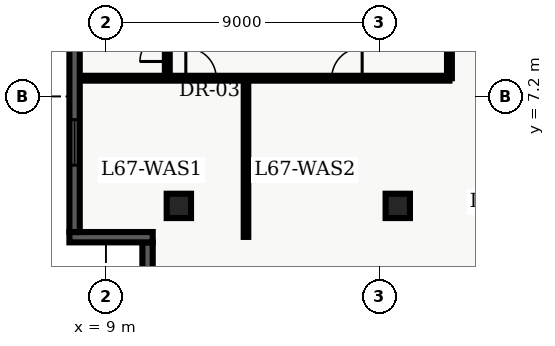
"""IFC4 building model, lengths in metres.
Left out: names, types, materials, properties, quantities, classifications, styles, units other than length and angle.
Written with IfcOpenShell. Run it as: python <this file> out.ifc"""

import sys

from ifc_helpers import new_model, entity, si_unit, converted_unit, direction, frame, origin_with_axes, origin_2d_with_axis, place, context, subcontext, project, spatial, polyline, rectangle, outline, extrude, element, fill, save


model = new_model("IFC4")
c1 = context("Model", 3, precision=1e-05, world=origin_with_axes(), true_north=direction((0.0, 1.0)))
c2 = subcontext(c1, "Body", "Model", "MODEL_VIEW")
j1 = project(units=[si_unit("LENGTHUNIT", "METRE"), converted_unit("PLANEANGLEUNIT", "DEGREE", entity("IfcPlaneAngleMeasure", 0.017), si_unit("PLANEANGLEUNIT", "RADIAN"), dimensions=[0, 0, 0, 0, 0, 0, 0])], contexts=[c1])
p1 = place(None, origin_with_axes())
s1 = spatial("IfcSite", under=j1, at=p1, CompositionType="ELEMENT")
p2 = place(p1, origin_with_axes())
s2 = spatial("IfcBuilding", under=s1, at=p2, CompositionType="ELEMENT")
p3 = place(p2, frame((0.0, 0.0, 272.4), z_axis=(0.0, 0.0, 1.0), x_axis=(1.0, 0.0, 0.0)))
s3 = spatial("IfcBuildingStorey", under=s2, at=p3, CompositionType="ELEMENT", Elevation=272.4)
for number, where, z_axis, x_axis in (
    (1, (11.4, 3.6, 0.0), (0.0, 0.0, 1.0), (1.0, 0.0, 0.0)),
    (2, (18.6, 3.6, 0.0), (0.0, 0.0, 1.0), (1.0, 0.0, 0.0)),
):
    element("IfcColumn", number, at=place(p3, frame(where, z_axis=z_axis, x_axis=x_axis)), inside=s3, PredefinedType="COLUMN", context=c2, shape_type="SweptSolid", body=[
        extrude(rectangle(XDim=0.8, YDim=0.8, at=origin_2d_with_axis()), origin_with_axes(), (0.0, 0.0, 1.0), 3.9),
    ])
p4 = place(p3, frame((8.135, 7.8, 0.0), z_axis=(0.0, 0.0, 1.0), x_axis=(1.0, 0.0, 0.0)))
e3 = element("IfcWall", 3, at=p4, inside=s3, PredefinedType="PARTITIONING", context=c2, shape_type="SweptSolid", body=[
    extrude(outline(polyline([(0.0, -0.08), (12.165, -0.08), (12.165, 0.08), (0.0, 0.08), (0.0, -0.08)])), origin_with_axes(), (0.0, 0.0, 1.0), 2.7),
])
p5 = place(p4, frame((3.994, 0.0, 0.0), z_axis=(0.0, 0.0, 1.0), x_axis=(1.0, 0.0, 0.0)))
e4 = element("IfcOpeningElement", 4, at=p5, cuts=e3, PredefinedType="OPENING", context=c2, shape_type="SweptSolid", body=[
    extrude(rectangle(XDim=1.0, YDim=0.18, at=origin_2d_with_axis()), origin_with_axes(), (0.0, 0.0, 1.0), 2.15),
])
p6 = place(p4, frame((8.794, 0.0, 0.0), z_axis=(0.0, 0.0, 1.0), x_axis=(1.0, 0.0, 0.0)))
e5 = element("IfcOpeningElement", 5, at=p6, cuts=e3, PredefinedType="OPENING", context=c2, shape_type="SweptSolid", body=[
    extrude(rectangle(XDim=1.0, YDim=0.18, at=origin_2d_with_axis()), origin_with_axes(), (0.0, 0.0, 1.0), 2.15),
])
p7 = place(p3, frame((20.3, 7.8, 0.0), z_axis=(0.0, 0.0, 1.0), x_axis=(0.0, 1.0, 0.0)))
e6 = element("IfcWall", 6, at=p7, inside=s3, PredefinedType="PARTITIONING", context=c2, shape_type="SweptSolid", body=[
    extrude(outline(polyline([(0.0, -0.08), (32.7, -0.08), (32.7, 0.08), (0.0, 0.08), (0.0, -0.08)])), origin_with_axes(), (0.0, 0.0, 1.0), 2.7),
])
p8 = place(p7, frame((14.2, 0.0, 0.0), z_axis=(0.0, 0.0, 1.0), x_axis=(1.0, 0.0, 0.0)))
e7 = element("IfcOpeningElement", 7, at=p8, cuts=e6, PredefinedType="OPENING", context=c2, shape_type="SweptSolid", body=[
    extrude(rectangle(XDim=1.0, YDim=0.18, at=origin_2d_with_axis()), origin_with_axes(), (0.0, 0.0, 1.0), 2.15),
])
p9 = place(p7, frame((18.779, 0.0, 0.0), z_axis=(0.0, 0.0, 1.0), x_axis=(1.0, 0.0, 0.0)))
e8 = element("IfcOpeningElement", 8, at=p9, cuts=e6, PredefinedType="OPENING", context=c2, shape_type="SweptSolid", body=[
    extrude(rectangle(XDim=1.0, YDim=0.18, at=origin_2d_with_axis()), origin_with_axes(), (0.0, 0.0, 1.0), 2.15),
])
p10 = place(p7, frame((23.784, 0.0, 0.0), z_axis=(0.0, 0.0, 1.0), x_axis=(1.0, 0.0, 0.0)))
e9 = element("IfcOpeningElement", 9, at=p10, cuts=e6, PredefinedType="OPENING", context=c2, shape_type="SweptSolid", body=[
    extrude(rectangle(XDim=1.0, YDim=0.18, at=origin_2d_with_axis()), origin_with_axes(), (0.0, 0.0, 1.0), 2.15),
])
p11 = place(p7, frame((27.651, 0.0, 0.0), z_axis=(0.0, 0.0, 1.0), x_axis=(1.0, 0.0, 0.0)))
e10 = element("IfcOpeningElement", 10, at=p11, cuts=e6, PredefinedType="OPENING", context=c2, shape_type="SweptSolid", body=[
    extrude(rectangle(XDim=1.0, YDim=0.18, at=origin_2d_with_axis()), origin_with_axes(), (0.0, 0.0, 1.0), 2.15),
])
p12 = place(p7, frame((5.475, 0.0, 0.0), z_axis=(0.0, 0.0, 1.0), x_axis=(1.0, 0.0, 0.0)))
e11 = element("IfcOpeningElement", 11, at=p12, cuts=e6, PredefinedType="OPENING", context=c2, shape_type="SweptSolid", body=[
    extrude(rectangle(XDim=1.05, YDim=0.18, at=origin_2d_with_axis()), origin_with_axes(), (0.0, 0.0, 1.0), 2.15),
])
p13 = place(p3, frame((11.02, 7.8, 0.0), z_axis=(0.0, 0.0, 1.0), x_axis=(0.0, 1.0, 0.0)))
e12 = element("IfcWall", 12, at=p13, inside=s3, PredefinedType="PARTITIONING", context=c2, shape_type="SweptSolid", body=[
    extrude(outline(polyline([(0.0, -0.08), (2.85, -0.08), (2.85, 0.08), (0.0, 0.08), (0.0, -0.08)])), origin_with_axes(), (0.0, 0.0, 1.0), 2.7),
])
p14 = place(p13, frame((1.0, 0.0, 0.0), z_axis=(0.0, 0.0, 1.0), x_axis=(1.0, 0.0, 0.0)))
e13 = element("IfcOpeningElement", 13, at=p14, cuts=e12, PredefinedType="OPENING", context=c2, shape_type="SweptSolid", body=[
    extrude(rectangle(XDim=0.9, YDim=0.18, at=origin_2d_with_axis()), origin_with_axes(), (0.0, 0.0, 1.0), 2.15),
])
p15 = place(p3, frame((13.608, 2.58, 0.0), z_axis=(0.0, 0.0, 1.0), x_axis=(0.0, 1.0, 0.0)))
e14 = element("IfcWall", 14, at=p15, inside=s3, PredefinedType="PARTITIONING", context=c2, shape_type="SweptSolid", body=[
    extrude(outline(polyline([(0.0, -0.075), (5.12, -0.075), (5.12, 0.075), (0.0, 0.075), (0.0, -0.075)])), origin_with_axes(), (0.0, 0.0, 1.0), 2.7),
])
p16 = place(p3, frame((10.37, 0.34, 0.0), z_axis=(0.0, 0.0, 1.0), x_axis=(0.0, 1.0, 0.0)))
e15 = element("IfcWall", 15, at=p16, inside=s3, PredefinedType="SOLIDWALL", context=c2, shape_type="SweptSolid", body=[
    extrude(outline(polyline([(0.0, -0.17), (2.06, -0.17), (2.06, 0.17), (0.0, 0.17), (0.0, -0.17)])), origin_with_axes(), (0.0, 0.0, 1.0), 3.66),
])
p17 = place(p3, frame((10.54, 2.57, 0.0), z_axis=(0.0, 0.0, 1.0), x_axis=(-1.0, 0.0, 0.0)))
e16 = element("IfcWall", 16, at=p17, inside=s3, PredefinedType="SOLIDWALL", context=c2, shape_type="SweptSolid", body=[
    extrude(outline(polyline([(0.0, -0.17), (2.74, -0.17), (2.74, 0.17), (0.0, 0.17), (0.0, -0.17)])), origin_with_axes(), (0.0, 0.0, 1.0), 3.66),
])
p18 = place(p3, frame((7.97, 2.74, 0.0), z_axis=(0.0, 0.0, 1.0), x_axis=(0.0, 1.0, 0.0)))
e17 = element("IfcWall", 17, at=p18, inside=s3, PredefinedType="SOLIDWALL", context=c2, shape_type="SweptSolid", body=[
    extrude(outline(polyline([(0.0, -0.17), (43.46, -0.17), (43.46, 0.17), (0.0, 0.17), (0.0, -0.17)])), origin_with_axes(), (0.0, 0.0, 1.0), 3.66),
])
p19 = place(p18, frame((2.948, 0.0, 0.45), z_axis=(0.0, 0.0, 1.0), x_axis=(1.0, 0.0, 0.0)))
e18 = element("IfcOpeningElement", 18, at=p19, cuts=e17, PredefinedType="OPENING", context=c2, shape_type="SweptSolid", body=[
    extrude(rectangle(XDim=1.5, YDim=0.36, at=origin_2d_with_axis()), origin_with_axes(), (0.0, 0.0, 1.0), 2.1),
])
p20 = place(p18, frame((7.643, 0.0, 0.45), z_axis=(0.0, 0.0, 1.0), x_axis=(1.0, 0.0, 0.0)))
e19 = element("IfcOpeningElement", 19, at=p20, cuts=e17, PredefinedType="OPENING", context=c2, shape_type="SweptSolid", body=[
    extrude(rectangle(XDim=1.5, YDim=0.36, at=origin_2d_with_axis()), origin_with_axes(), (0.0, 0.0, 1.0), 2.1),
])
p21 = place(p18, frame((12.339, 0.0, 0.45), z_axis=(0.0, 0.0, 1.0), x_axis=(1.0, 0.0, 0.0)))
e20 = element("IfcOpeningElement", 20, at=p21, cuts=e17, PredefinedType="OPENING", context=c2, shape_type="SweptSolid", body=[
    extrude(rectangle(XDim=1.5, YDim=0.36, at=origin_2d_with_axis()), origin_with_axes(), (0.0, 0.0, 1.0), 2.1),
])
p22 = place(p18, frame((17.034, 0.0, 0.45), z_axis=(0.0, 0.0, 1.0), x_axis=(1.0, 0.0, 0.0)))
e21 = element("IfcOpeningElement", 21, at=p22, cuts=e17, PredefinedType="OPENING", context=c2, shape_type="SweptSolid", body=[
    extrude(rectangle(XDim=1.5, YDim=0.36, at=origin_2d_with_axis()), origin_with_axes(), (0.0, 0.0, 1.0), 2.1),
])
p23 = place(p18, frame((22.58, 0.0, 0.45), z_axis=(0.0, 0.0, 1.0), x_axis=(1.0, 0.0, 0.0)))
e22 = element("IfcOpeningElement", 22, at=p23, cuts=e17, PredefinedType="OPENING", context=c2, shape_type="SweptSolid", body=[
    extrude(rectangle(XDim=1.5, YDim=0.36, at=origin_2d_with_axis()), origin_with_axes(), (0.0, 0.0, 1.0), 2.1),
])
p24 = place(p18, frame((26.426, 0.0, 0.45), z_axis=(0.0, 0.0, 1.0), x_axis=(1.0, 0.0, 0.0)))
e23 = element("IfcOpeningElement", 23, at=p24, cuts=e17, PredefinedType="OPENING", context=c2, shape_type="SweptSolid", body=[
    extrude(rectangle(XDim=1.5, YDim=0.36, at=origin_2d_with_axis()), origin_with_axes(), (0.0, 0.0, 1.0), 2.1),
])
p25 = place(p18, frame((31.121, 0.0, 0.45), z_axis=(0.0, 0.0, 1.0), x_axis=(1.0, 0.0, 0.0)))
e24 = element("IfcOpeningElement", 24, at=p25, cuts=e17, PredefinedType="OPENING", context=c2, shape_type="SweptSolid", body=[
    extrude(rectangle(XDim=1.5, YDim=0.36, at=origin_2d_with_axis()), origin_with_axes(), (0.0, 0.0, 1.0), 2.1),
])
p26 = place(p18, frame((35.817, 0.0, 0.45), z_axis=(0.0, 0.0, 1.0), x_axis=(1.0, 0.0, 0.0)))
e25 = element("IfcOpeningElement", 25, at=p26, cuts=e17, PredefinedType="OPENING", context=c2, shape_type="SweptSolid", body=[
    extrude(rectangle(XDim=1.5, YDim=0.36, at=origin_2d_with_axis()), origin_with_axes(), (0.0, 0.0, 1.0), 2.1),
])
p27 = place(p18, frame((40.512, 0.0, 0.45), z_axis=(0.0, 0.0, 1.0), x_axis=(1.0, 0.0, 0.0)))
e26 = element("IfcOpeningElement", 26, at=p27, cuts=e17, PredefinedType="OPENING", context=c2, shape_type="SweptSolid", body=[
    extrude(rectangle(XDim=1.5, YDim=0.36, at=origin_2d_with_axis()), origin_with_axes(), (0.0, 0.0, 1.0), 2.1),
])
p28 = place(p13, frame((1.0, 0.0, 0.0), z_axis=(0.0, 0.0, 1.0), x_axis=(1.0, 0.0, 0.0)))
e27 = element("IfcDoor", 27, at=p28, inside=s3, OperationType="SINGLE_SWING_LEFT", PredefinedType="DOOR", context=c2, shape_type="SweptSolid", body=[
    extrude(rectangle(XDim=0.9, YDim=0.09, at=origin_2d_with_axis()), origin_with_axes(), (0.0, 0.0, 1.0), 2.15),
])
fill(e13, e27)
p29 = place(p4, frame((3.994, 0.0, 0.0), z_axis=(0.0, 0.0, 1.0), x_axis=(1.0, 0.0, 0.0)))
e28 = element("IfcDoor", 28, at=p29, inside=s3, OperationType="SINGLE_SWING_LEFT", PredefinedType="DOOR", context=c2, shape_type="SweptSolid", body=[
    extrude(rectangle(XDim=1.0, YDim=0.09, at=origin_2d_with_axis()), origin_with_axes(), (0.0, 0.0, 1.0), 2.15),
])
fill(e4, e28)
p30 = place(p4, frame((8.794, 0.0, 0.0), z_axis=(0.0, 0.0, 1.0), x_axis=(1.0, 0.0, 0.0)))
e29 = element("IfcDoor", 29, at=p30, inside=s3, OperationType="SINGLE_SWING_RIGHT", PredefinedType="DOOR", context=c2, shape_type="SweptSolid", body=[
    extrude(rectangle(XDim=1.0, YDim=0.09, at=origin_2d_with_axis()), origin_with_axes(), (0.0, 0.0, 1.0), 2.15),
])
fill(e5, e29)
p31 = place(p18, frame((2.948, 0.0, 0.45), z_axis=(0.0, 0.0, 1.0), x_axis=(1.0, 0.0, 0.0)))
e30 = element("IfcWindow", 30, at=p31, inside=s3, PredefinedType="WINDOW", context=c2, shape_type="SweptSolid", body=[
    extrude(rectangle(XDim=1.5, YDim=0.09, at=origin_2d_with_axis()), origin_with_axes(), (0.0, 0.0, 1.0), 2.1),
])
fill(e18, e30)
save(model, sys.argv[1])
